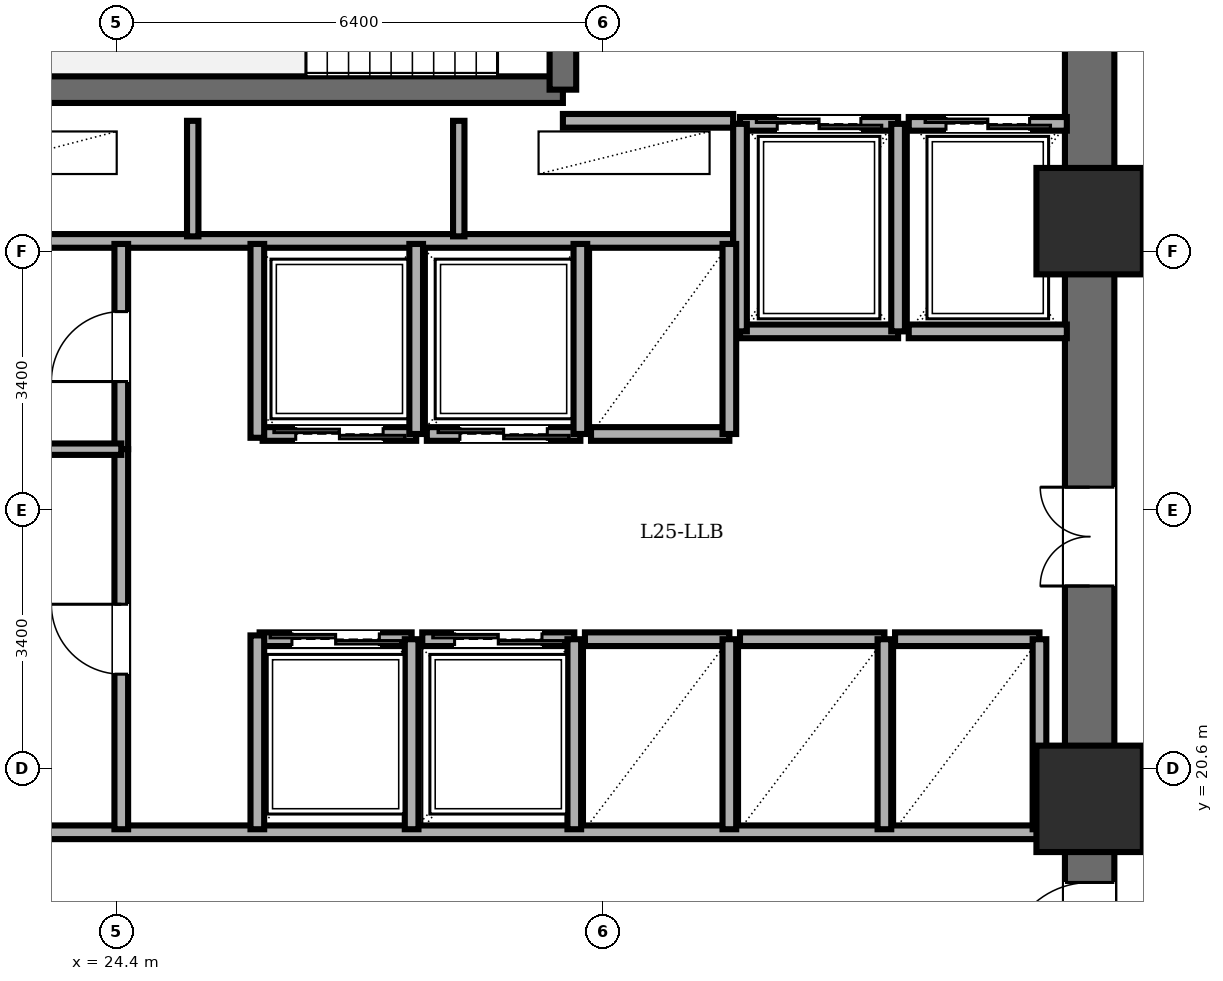
"""IFC4 building model, lengths in metres.
Left out: names, types, materials, properties, quantities, classifications, styles, units other than length and angle.
Written with IfcOpenShell. Run it as: python <this file> out.ifc"""

import sys

from ifc_helpers import new_model, si_unit, direction, frame, frame_2d, origin, origin_2d, place, context, subcontext, project, spatial, rectangle, extrude, element, fill, save


model = new_model("IFC4")
c1 = context("Model", 3, precision=1e-05, world=origin(), true_north=direction((0.0, 1.0)))
c2 = subcontext(c1, "Body", "Model", "MODEL_VIEW")
j1 = project(units=[si_unit("LENGTHUNIT", "METRE"), si_unit("PLANEANGLEUNIT", "RADIAN")], contexts=[c1])
p1 = place(None, origin())
s1 = spatial("IfcSite", under=j1, at=p1, CompositionType="ELEMENT")
p2 = place(p1, origin())
s2 = spatial("IfcBuilding", under=s1, at=p2, CompositionType="ELEMENT")
p3 = place(p2, frame((0.0, 0.0, 97.1)))
s3 = spatial("IfcBuildingStorey", under=s2, at=p3, CompositionType="ELEMENT", Elevation=97.1)
for number, where, z_axis, x_axis in (
    (1, (37.2, 20.2, 0.0), (0.0, 0.0, 1.0), (1.0, 0.0, 0.0)),
    (2, (37.2, 27.8, 0.0), (0.0, 0.0, 1.0), (1.0, 0.0, 0.0)),
):
    element("IfcColumn", number, at=place(p3, frame(where, z_axis=z_axis, x_axis=x_axis)), inside=s3, PredefinedType="COLUMN", context=c2, shape_type="SweptSolid", body=[
        extrude(rectangle(XDim=1.4, YDim=1.4, at=origin_2d()), origin(), (0.0, 0.0, 1.0), 3.6),
    ])
p4 = place(p3, frame((37.2, 14.4, 0.0), z_axis=(0.0, 0.0, 1.0), x_axis=(0.0, 1.0, 0.0)))
e3 = element("IfcWall", 3, at=p4, inside=s3, PredefinedType="SHEAR", context=c2, shape_type="SweptSolid", body=[
    extrude(rectangle(XDim=19.2, YDim=0.65, at=frame_2d((9.6, 0.0))), origin(), (0.0, 0.0, 1.0), 3.4),
])
p5 = place(p4, frame((15.8, 0.0, 0.0)))
e4 = element("IfcOpeningElement", 4, at=p5, cuts=e3, PredefinedType="OPENING", context=c2, shape_type="SweptSolid", body=[
    extrude(rectangle(XDim=1.15, YDim=2.15, at=frame_2d((0.575, 1.075))), frame((0.0, 0.335, 0.0), z_axis=(0.0, -1.0, 0.0), x_axis=(1.0, 0.0, 0.0)), (0.0, 0.0, 1.0), 0.67),
])
p6 = place(p4, frame((3.6, 0.0, 0.0)))
e5 = element("IfcOpeningElement", 5, at=p6, cuts=e3, PredefinedType="OPENING", context=c2, shape_type="SweptSolid", body=[
    extrude(rectangle(XDim=1.1, YDim=2.15, at=frame_2d((0.55, 1.075))), frame((0.0, 0.335, 0.0), z_axis=(0.0, -1.0, 0.0), x_axis=(1.0, 0.0, 0.0)), (0.0, 0.0, 1.0), 0.67),
])
p7 = place(p4, frame((8.6, 0.0, 0.0)))
e6 = element("IfcOpeningElement", 6, at=p7, cuts=e3, PredefinedType="OPENING", context=c2, shape_type="SweptSolid", body=[
    extrude(rectangle(XDim=1.3, YDim=2.2, at=frame_2d((0.65, 1.1))), frame((0.0, 0.335, 0.0), z_axis=(0.0, -1.0, 0.0), x_axis=(1.0, 0.0, 0.0)), (0.0, 0.0, 1.0), 0.67),
])
p8 = place(p3, frame((22.48, 29.53, 0.0), z_axis=(0.0, 0.0, 1.0), x_axis=(1.0, 0.0, 0.0)))
e7 = element("IfcWall", 7, at=p8, inside=s3, PredefinedType="SOLIDWALL", context=c2, shape_type="SweptSolid", body=[
    extrude(rectangle(XDim=7.79, YDim=0.35, at=frame_2d((3.895, 0.0))), origin(), (0.0, 0.0, 1.0), 3.4),
])
p9 = place(p3, frame((30.27, 29.53, 0.0), z_axis=(0.0, 0.0, 1.0), x_axis=(0.0, 1.0, 0.0)))
e8 = element("IfcWall", 8, at=p9, inside=s3, PredefinedType="SOLIDWALL", context=c2, shape_type="SweptSolid", body=[
    extrude(rectangle(XDim=3.58, YDim=0.35, at=frame_2d((1.79, 0.0))), origin(), (0.0, 0.0, 1.0), 3.4),
])
p10 = place(p9, frame((1.25, 0.0, 0.0)))
e9 = element("IfcOpeningElement", 9, at=p10, cuts=e8, PredefinedType="OPENING", context=c2, shape_type="SweptSolid", body=[
    extrude(rectangle(XDim=1.1, YDim=2.15, at=frame_2d((0.55, 1.075))), frame((0.0, 0.185, 0.0), z_axis=(0.0, -1.0, 0.0), x_axis=(1.0, 0.0, 0.0)), (0.0, 0.0, 1.0), 0.37),
])
p11 = place(p3, frame((30.27, 29.12, 0.0), z_axis=(0.0, 0.0, 1.0), x_axis=(1.0, 0.0, 0.0)))
e10 = element("IfcWall", 10, at=p11, inside=s3, PredefinedType="PARTITIONING", context=c2, shape_type="SweptSolid", body=[
    extrude(rectangle(XDim=2.24, YDim=0.18, at=frame_2d((1.12, 0.0))), origin(), (0.0, 0.0, 1.0), 3.4),
])
p12 = place(p3, frame((21.95, 27.54, 0.0), z_axis=(0.0, 0.0, 1.0), x_axis=(1.0, 0.0, 0.0)))
e11 = element("IfcWall", 11, at=p12, inside=s3, PredefinedType="PARTITIONING", context=c2, shape_type="SweptSolid", body=[
    extrude(rectangle(XDim=10.56, YDim=0.18, at=frame_2d((5.28, 0.0))), origin(), (0.0, 0.0, 1.0), 3.4),
])
for number, where, z_axis, x_axis in (
    (12, (25.4, 27.6, 0.0), (0.0, 0.0, 1.0), (0.0, 1.0, 0.0)),
    (13, (28.9, 27.6, 0.0), (0.0, 0.0, 1.0), (0.0, 1.0, 0.0)),
):
    element("IfcWall", number, at=place(p3, frame(where, z_axis=z_axis, x_axis=x_axis)), inside=s3, PredefinedType="PARTITIONING", context=c2, shape_type="SweptSolid", body=[
        extrude(rectangle(XDim=1.52, YDim=0.15, at=frame_2d((0.76, 0.0))), origin(), (0.0, 0.0, 1.0), 3.4),
    ])
p13 = place(p3, frame((21.95, 19.76, 0.0), z_axis=(0.0, 0.0, 1.0), x_axis=(1.0, 0.0, 0.0)))
e14 = element("IfcWall", 14, at=p13, inside=s3, PredefinedType="PARTITIONING", context=c2, shape_type="SweptSolid", body=[
    extrude(rectangle(XDim=14.87, YDim=0.18, at=frame_2d((7.435, 0.0))), origin(), (0.0, 0.0, 1.0), 3.4),
])
p14 = place(p3, frame((32.6, 29.08, 0.0), z_axis=(0.0, 0.0, 1.0), x_axis=(1.0, 0.0, 0.0)))
e15 = element("IfcWall", 15, at=p14, inside=s3, PredefinedType="PARTITIONING", context=c2, shape_type="SweptSolid", body=[
    extrude(rectangle(XDim=2.08, YDim=0.18, at=frame_2d((1.04, 0.0))), origin(), (0.0, 0.0, 1.0), 3.4),
])
p15 = place(p14, frame((0.49, 0.0, 0.0)))
e16 = element("IfcOpeningElement", 16, at=p15, cuts=e15, PredefinedType="OPENING", context=c2, shape_type="SweptSolid", body=[
    extrude(rectangle(XDim=1.1, YDim=2.2, at=frame_2d((0.55, 1.1))), frame((0.0, 0.1, 0.0), z_axis=(0.0, -1.0, 0.0), x_axis=(1.0, 0.0, 0.0)), (0.0, 0.0, 1.0), 0.2),
])
p16 = place(p3, frame((34.68, 26.35, 0.0), z_axis=(0.0, 0.0, 1.0), x_axis=(-1.0, 0.0, 0.0)))
e17 = element("IfcWall", 17, at=p16, inside=s3, PredefinedType="PARTITIONING", context=c2, shape_type="SweptSolid", body=[
    extrude(rectangle(XDim=2.08, YDim=0.18, at=frame_2d((1.04, 0.0))), origin(), (0.0, 0.0, 1.0), 3.4),
])
for number, where, z_axis, x_axis in (
    (18, (34.68, 26.35, 0.0), (0.0, 0.0, 1.0), (0.0, 1.0, 0.0)),
    (19, (32.6, 29.08, 0.0), (0.0, 0.0, 1.0), (0.0, -1.0, 0.0)),
):
    element("IfcWall", number, at=place(p3, frame(where, z_axis=z_axis, x_axis=x_axis)), inside=s3, PredefinedType="PARTITIONING", context=c2, shape_type="SweptSolid", body=[
        extrude(rectangle(XDim=2.73, YDim=0.18, at=frame_2d((1.365, 0.0))), origin(), (0.0, 0.0, 1.0), 3.4),
    ])
p17 = place(p3, frame((34.82, 29.08, 0.0), z_axis=(0.0, 0.0, 1.0), x_axis=(1.0, 0.0, 0.0)))
e20 = element("IfcWall", 20, at=p17, inside=s3, PredefinedType="PARTITIONING", context=c2, shape_type="SweptSolid", body=[
    extrude(rectangle(XDim=2.08, YDim=0.18, at=frame_2d((1.04, 0.0))), origin(), (0.0, 0.0, 1.0), 3.4),
])
p18 = place(p17, frame((0.49, 0.0, 0.0)))
e21 = element("IfcOpeningElement", 21, at=p18, cuts=e20, PredefinedType="OPENING", context=c2, shape_type="SweptSolid", body=[
    extrude(rectangle(XDim=1.1, YDim=2.2, at=frame_2d((0.55, 1.1))), frame((0.0, 0.1, 0.0), z_axis=(0.0, -1.0, 0.0), x_axis=(1.0, 0.0, 0.0)), (0.0, 0.0, 1.0), 0.2),
])
p19 = place(p3, frame((36.9, 26.35, 0.0), z_axis=(0.0, 0.0, 1.0), x_axis=(-1.0, 0.0, 0.0)))
e22 = element("IfcWall", 22, at=p19, inside=s3, PredefinedType="PARTITIONING", context=c2, shape_type="SweptSolid", body=[
    extrude(rectangle(XDim=2.08, YDim=0.18, at=frame_2d((1.04, 0.0))), origin(), (0.0, 0.0, 1.0), 3.4),
])
p20 = place(p3, frame((28.34, 25.0, 0.0), z_axis=(0.0, 0.0, 1.0), x_axis=(-1.0, 0.0, 0.0)))
e23 = element("IfcWall", 23, at=p20, inside=s3, PredefinedType="PARTITIONING", context=c2, shape_type="SweptSolid", body=[
    extrude(rectangle(XDim=2.02, YDim=0.18, at=frame_2d((1.01, 0.0))), origin(), (0.0, 0.0, 1.0), 3.4),
])
p21 = place(p20, frame((0.435, 0.0, 0.0)))
e24 = element("IfcOpeningElement", 24, at=p21, cuts=e23, PredefinedType="OPENING", context=c2, shape_type="SweptSolid", body=[
    extrude(rectangle(XDim=1.15, YDim=2.2, at=frame_2d((0.575, 1.1))), frame((0.0, 0.1, 0.0), z_axis=(0.0, -1.0, 0.0), x_axis=(1.0, 0.0, 0.0)), (0.0, 0.0, 1.0), 0.2),
])
p22 = place(p3, frame((28.34, 25.0, 0.0), z_axis=(0.0, 0.0, 1.0), x_axis=(0.0, 1.0, 0.0)))
e25 = element("IfcWall", 25, at=p22, inside=s3, PredefinedType="PARTITIONING", context=c2, shape_type="SweptSolid", body=[
    extrude(rectangle(XDim=2.5, YDim=0.18, at=frame_2d((1.25, 0.0))), origin(), (0.0, 0.0, 1.0), 3.4),
])
p23 = place(p3, frame((30.5, 25.0, 0.0), z_axis=(0.0, 0.0, 1.0), x_axis=(-1.0, 0.0, 0.0)))
e26 = element("IfcWall", 26, at=p23, inside=s3, PredefinedType="PARTITIONING", context=c2, shape_type="SweptSolid", body=[
    extrude(rectangle(XDim=2.02, YDim=0.18, at=frame_2d((1.01, 0.0))), origin(), (0.0, 0.0, 1.0), 3.4),
])
p24 = place(p23, frame((0.435, 0.0, 0.0)))
e27 = element("IfcOpeningElement", 27, at=p24, cuts=e26, PredefinedType="OPENING", context=c2, shape_type="SweptSolid", body=[
    extrude(rectangle(XDim=1.15, YDim=2.2, at=frame_2d((0.575, 1.1))), frame((0.0, 0.1, 0.0), z_axis=(0.0, -1.0, 0.0), x_axis=(1.0, 0.0, 0.0)), (0.0, 0.0, 1.0), 0.2),
])
p25 = place(p3, frame((30.5, 25.0, 0.0), z_axis=(0.0, 0.0, 1.0), x_axis=(0.0, 1.0, 0.0)))
e28 = element("IfcWall", 28, at=p25, inside=s3, PredefinedType="PARTITIONING", context=c2, shape_type="SweptSolid", body=[
    extrude(rectangle(XDim=2.5, YDim=0.18, at=frame_2d((1.25, 0.0))), origin(), (0.0, 0.0, 1.0), 3.4),
])
p26 = place(p3, frame((26.28, 22.3, 0.0), z_axis=(0.0, 0.0, 1.0), x_axis=(1.0, 0.0, 0.0)))
e29 = element("IfcWall", 29, at=p26, inside=s3, PredefinedType="PARTITIONING", context=c2, shape_type="SweptSolid", body=[
    extrude(rectangle(XDim=2.0, YDim=0.18, at=frame_2d((1.0, 0.0))), origin(), (0.0, 0.0, 1.0), 3.4),
])
p27 = place(p26, frame((0.425, 0.0, 0.0)))
e30 = element("IfcOpeningElement", 30, at=p27, cuts=e29, PredefinedType="OPENING", context=c2, shape_type="SweptSolid", body=[
    extrude(rectangle(XDim=1.15, YDim=2.2, at=frame_2d((0.575, 1.1))), frame((0.0, 0.1, 0.0), z_axis=(0.0, -1.0, 0.0), x_axis=(1.0, 0.0, 0.0)), (0.0, 0.0, 1.0), 0.2),
])
p28 = place(p3, frame((28.28, 19.8, 0.0), z_axis=(0.0, 0.0, 1.0), x_axis=(0.0, 1.0, 0.0)))
e31 = element("IfcWall", 31, at=p28, inside=s3, PredefinedType="PARTITIONING", context=c2, shape_type="SweptSolid", body=[
    extrude(rectangle(XDim=2.5, YDim=0.18, at=frame_2d((1.25, 0.0))), origin(), (0.0, 0.0, 1.0), 3.4),
])
p29 = place(p3, frame((28.42, 22.3, 0.0), z_axis=(0.0, 0.0, 1.0), x_axis=(1.0, 0.0, 0.0)))
e32 = element("IfcWall", 32, at=p29, inside=s3, PredefinedType="PARTITIONING", context=c2, shape_type="SweptSolid", body=[
    extrude(rectangle(XDim=2.0, YDim=0.18, at=frame_2d((1.0, 0.0))), origin(), (0.0, 0.0, 1.0), 3.4),
])
p30 = place(p29, frame((0.425, 0.0, 0.0)))
e33 = element("IfcOpeningElement", 33, at=p30, cuts=e32, PredefinedType="OPENING", context=c2, shape_type="SweptSolid", body=[
    extrude(rectangle(XDim=1.15, YDim=2.2, at=frame_2d((0.575, 1.1))), frame((0.0, 0.1, 0.0), z_axis=(0.0, -1.0, 0.0), x_axis=(1.0, 0.0, 0.0)), (0.0, 0.0, 1.0), 0.2),
])
p31 = place(p3, frame((30.42, 19.8, 0.0), z_axis=(0.0, 0.0, 1.0), x_axis=(0.0, 1.0, 0.0)))
e34 = element("IfcWall", 34, at=p31, inside=s3, PredefinedType="PARTITIONING", context=c2, shape_type="SweptSolid", body=[
    extrude(rectangle(XDim=2.5, YDim=0.18, at=frame_2d((1.25, 0.0))), origin(), (0.0, 0.0, 1.0), 3.4),
])
p32 = place(p3, frame((32.46, 25.0, 0.0), z_axis=(0.0, 0.0, 1.0), x_axis=(-1.0, 0.0, 0.0)))
e35 = element("IfcWall", 35, at=p32, inside=s3, PredefinedType="PARTITIONING", context=c2, shape_type="SweptSolid", body=[
    extrude(rectangle(XDim=1.82, YDim=0.18, at=frame_2d((0.91, 0.0))), origin(), (0.0, 0.0, 1.0), 3.4),
])
p33 = place(p3, frame((32.46, 25.0, 0.0), z_axis=(0.0, 0.0, 1.0), x_axis=(0.0, 1.0, 0.0)))
e36 = element("IfcWall", 36, at=p33, inside=s3, PredefinedType="PARTITIONING", context=c2, shape_type="SweptSolid", body=[
    extrude(rectangle(XDim=2.5, YDim=0.18, at=frame_2d((1.25, 0.0))), origin(), (0.0, 0.0, 1.0), 3.4),
])
p34 = place(p3, frame((30.56, 22.3, 0.0), z_axis=(0.0, 0.0, 1.0), x_axis=(1.0, 0.0, 0.0)))
e37 = element("IfcWall", 37, at=p34, inside=s3, PredefinedType="PARTITIONING", context=c2, shape_type="SweptSolid", body=[
    extrude(rectangle(XDim=1.9, YDim=0.18, at=frame_2d((0.95, 0.0))), origin(), (0.0, 0.0, 1.0), 3.4),
])
p35 = place(p3, frame((32.46, 19.8, 0.0), z_axis=(0.0, 0.0, 1.0), x_axis=(0.0, 1.0, 0.0)))
e38 = element("IfcWall", 38, at=p35, inside=s3, PredefinedType="PARTITIONING", context=c2, shape_type="SweptSolid", body=[
    extrude(rectangle(XDim=2.5, YDim=0.18, at=frame_2d((1.25, 0.0))), origin(), (0.0, 0.0, 1.0), 3.4),
])
p36 = place(p3, frame((32.6, 22.3, 0.0), z_axis=(0.0, 0.0, 1.0), x_axis=(1.0, 0.0, 0.0)))
e39 = element("IfcWall", 39, at=p36, inside=s3, PredefinedType="PARTITIONING", context=c2, shape_type="SweptSolid", body=[
    extrude(rectangle(XDim=1.9, YDim=0.18, at=frame_2d((0.95, 0.0))), origin(), (0.0, 0.0, 1.0), 3.4),
])
p37 = place(p3, frame((34.5, 19.8, 0.0), z_axis=(0.0, 0.0, 1.0), x_axis=(0.0, 1.0, 0.0)))
e40 = element("IfcWall", 40, at=p37, inside=s3, PredefinedType="PARTITIONING", context=c2, shape_type="SweptSolid", body=[
    extrude(rectangle(XDim=2.5, YDim=0.18, at=frame_2d((1.25, 0.0))), origin(), (0.0, 0.0, 1.0), 3.4),
])
p38 = place(p3, frame((34.64, 22.3, 0.0), z_axis=(0.0, 0.0, 1.0), x_axis=(1.0, 0.0, 0.0)))
e41 = element("IfcWall", 41, at=p38, inside=s3, PredefinedType="PARTITIONING", context=c2, shape_type="SweptSolid", body=[
    extrude(rectangle(XDim=1.9, YDim=0.18, at=frame_2d((0.95, 0.0))), origin(), (0.0, 0.0, 1.0), 3.4),
])
p39 = place(p3, frame((36.54, 19.8, 0.0), z_axis=(0.0, 0.0, 1.0), x_axis=(0.0, 1.0, 0.0)))
e42 = element("IfcWall", 42, at=p39, inside=s3, PredefinedType="PARTITIONING", context=c2, shape_type="SweptSolid", body=[
    extrude(rectangle(XDim=2.5, YDim=0.18, at=frame_2d((1.25, 0.0))), origin(), (0.0, 0.0, 1.0), 3.4),
])
p40 = place(p3, frame((24.46, 24.8, 0.0), z_axis=(0.0, 0.0, 1.0), x_axis=(0.0, 1.0, 0.0)))
e43 = element("IfcWall", 43, at=p40, inside=s3, PredefinedType="PARTITIONING", context=c2, shape_type="SweptSolid", body=[
    extrude(rectangle(XDim=2.7, YDim=0.18, at=frame_2d((1.35, 0.0))), origin(), (0.0, 0.0, 1.0), 3.4),
])
p41 = place(p40, frame((0.89, 0.0, 0.0)))
e44 = element("IfcOpeningElement", 44, at=p41, cuts=e43, PredefinedType="OPENING", context=c2, shape_type="SweptSolid", body=[
    extrude(rectangle(XDim=0.92, YDim=2.1, at=frame_2d((0.46, 1.05))), frame((0.0, 0.1, 0.0), z_axis=(0.0, -1.0, 0.0), x_axis=(1.0, 0.0, 0.0)), (0.0, 0.0, 1.0), 0.2),
])
p42 = place(p3, frame((24.46, 19.8, 0.0), z_axis=(0.0, 0.0, 1.0), x_axis=(0.0, 1.0, 0.0)))
e45 = element("IfcWall", 45, at=p42, inside=s3, PredefinedType="PARTITIONING", context=c2, shape_type="SweptSolid", body=[
    extrude(rectangle(XDim=5.0, YDim=0.18, at=frame_2d((2.5, 0.0))), origin(), (0.0, 0.0, 1.0), 3.4),
])
p43 = place(p42, frame((2.04, 0.0, 0.0)))
e46 = element("IfcOpeningElement", 46, at=p43, cuts=e45, PredefinedType="OPENING", context=c2, shape_type="SweptSolid", body=[
    extrude(rectangle(XDim=0.92, YDim=2.1, at=frame_2d((0.46, 1.05))), frame((0.0, 0.1, 0.0), z_axis=(0.0, -1.0, 0.0), x_axis=(1.0, 0.0, 0.0)), (0.0, 0.0, 1.0), 0.2),
])
p44 = place(p3, frame((21.95, 24.8, 0.0), z_axis=(0.0, 0.0, 1.0), x_axis=(1.0, 0.0, 0.0)))
e47 = element("IfcWall", 47, at=p44, inside=s3, PredefinedType="PARTITIONING", context=c2, shape_type="SweptSolid", body=[
    extrude(rectangle(XDim=2.51, YDim=0.15, at=frame_2d((1.255, 0.0))), origin(), (0.0, 0.0, 1.0), 3.4),
])
for number, where, z_axis, x_axis in (
    (48, (26.25, 24.95, 0.0), (0.0, 0.0, 1.0), (0.0, 1.0, 0.0)),
    (49, (26.25, 19.8, 0.0), (0.0, 0.0, 1.0), (0.0, 1.0, 0.0)),
):
    element("IfcWall", number, at=place(p3, frame(where, z_axis=z_axis, x_axis=x_axis)), inside=s3, PredefinedType="PARTITIONING", context=c2, shape_type="SweptSolid", body=[
        extrude(rectangle(XDim=2.55, YDim=0.18, at=frame_2d((1.275, 0.0))), origin(), (0.0, 0.0, 1.0), 3.4),
    ])
p45 = place(p6, origin())
e50 = element("IfcDoor", 50, at=p45, inside=s3, OperationType="SINGLE_SWING_LEFT", PredefinedType="DOOR", context=c2, shape_type="SweptSolid", body=[
    extrude(rectangle(XDim=1.1, YDim=2.15, at=frame_2d((0.55, 1.075))), frame((0.0, 0.025, 0.0), z_axis=(0.0, -1.0, 0.0), x_axis=(1.0, 0.0, 0.0)), (0.0, 0.0, 1.0), 0.05),
])
fill(e5, e50)
p46 = place(p15, origin())
e51 = element("IfcDoor", 51, at=p46, inside=s3, OperationType="DOUBLE_DOOR_SLIDING", PredefinedType="DOOR", context=c2, shape_type="SweptSolid", body=[
    extrude(rectangle(XDim=1.1, YDim=2.2, at=frame_2d((0.55, 1.1))), frame((0.0, 0.025, 0.0), z_axis=(0.0, -1.0, 0.0), x_axis=(1.0, 0.0, 0.0)), (0.0, 0.0, 1.0), 0.05),
])
fill(e16, e51)
p47 = place(p18, origin())
e52 = element("IfcDoor", 52, at=p47, inside=s3, OperationType="DOUBLE_DOOR_SLIDING", PredefinedType="DOOR", context=c2, shape_type="SweptSolid", body=[
    extrude(rectangle(XDim=1.1, YDim=2.2, at=frame_2d((0.55, 1.1))), frame((0.0, 0.025, 0.0), z_axis=(0.0, -1.0, 0.0), x_axis=(1.0, 0.0, 0.0)), (0.0, 0.0, 1.0), 0.05),
])
fill(e21, e52)
p48 = place(p21, origin())
e53 = element("IfcDoor", 53, at=p48, inside=s3, OperationType="DOUBLE_DOOR_SLIDING", PredefinedType="DOOR", context=c2, shape_type="SweptSolid", body=[
    extrude(rectangle(XDim=1.15, YDim=2.2, at=frame_2d((0.575, 1.1))), frame((0.0, 0.025, 0.0), z_axis=(0.0, -1.0, 0.0), x_axis=(1.0, 0.0, 0.0)), (0.0, 0.0, 1.0), 0.05),
])
fill(e24, e53)
p49 = place(p24, origin())
e54 = element("IfcDoor", 54, at=p49, inside=s3, OperationType="DOUBLE_DOOR_SLIDING", PredefinedType="DOOR", context=c2, shape_type="SweptSolid", body=[
    extrude(rectangle(XDim=1.15, YDim=2.2, at=frame_2d((0.575, 1.1))), frame((0.0, 0.025, 0.0), z_axis=(0.0, -1.0, 0.0), x_axis=(1.0, 0.0, 0.0)), (0.0, 0.0, 1.0), 0.05),
])
fill(e27, e54)
p50 = place(p27, origin())
e55 = element("IfcDoor", 55, at=p50, inside=s3, OperationType="DOUBLE_DOOR_SLIDING", PredefinedType="DOOR", context=c2, shape_type="SweptSolid", body=[
    extrude(rectangle(XDim=1.15, YDim=2.2, at=frame_2d((0.575, 1.1))), frame((0.0, 0.025, 0.0), z_axis=(0.0, -1.0, 0.0), x_axis=(1.0, 0.0, 0.0)), (0.0, 0.0, 1.0), 0.05),
])
fill(e30, e55)
p51 = place(p30, origin())
e56 = element("IfcDoor", 56, at=p51, inside=s3, OperationType="DOUBLE_DOOR_SLIDING", PredefinedType="DOOR", context=c2, shape_type="SweptSolid", body=[
    extrude(rectangle(XDim=1.15, YDim=2.2, at=frame_2d((0.575, 1.1))), frame((0.0, 0.025, 0.0), z_axis=(0.0, -1.0, 0.0), x_axis=(1.0, 0.0, 0.0)), (0.0, 0.0, 1.0), 0.05),
])
fill(e33, e56)
p52 = place(p41, origin())
e57 = element("IfcDoor", 57, at=p52, inside=s3, OperationType="SINGLE_SWING_LEFT", PredefinedType="DOOR", context=c2, shape_type="SweptSolid", body=[
    extrude(rectangle(XDim=0.92, YDim=2.1, at=frame_2d((0.46, 1.05))), frame((0.0, 0.025, 0.0), z_axis=(0.0, -1.0, 0.0), x_axis=(1.0, 0.0, 0.0)), (0.0, 0.0, 1.0), 0.05),
])
fill(e44, e57)
p53 = place(p43, origin())
e58 = element("IfcDoor", 58, at=p53, inside=s3, OperationType="SINGLE_SWING_RIGHT", PredefinedType="DOOR", context=c2, shape_type="SweptSolid", body=[
    extrude(rectangle(XDim=0.92, YDim=2.1, at=frame_2d((0.46, 1.05))), frame((0.0, 0.025, 0.0), z_axis=(0.0, -1.0, 0.0), x_axis=(1.0, 0.0, 0.0)), (0.0, 0.0, 1.0), 0.05),
])
fill(e46, e58)
p54 = place(p7, origin())
e59 = element("IfcDoor", 59, at=p54, inside=s3, OperationType="DOUBLE_DOOR_SINGLE_SWING", PredefinedType="DOOR", context=c2, shape_type="SweptSolid", body=[
    extrude(rectangle(XDim=1.3, YDim=2.2, at=frame_2d((0.65, 1.1))), frame((0.0, 0.025, 0.0), z_axis=(0.0, -1.0, 0.0), x_axis=(1.0, 0.0, 0.0)), (0.0, 0.0, 1.0), 0.05),
])
fill(e6, e59)
save(model, sys.argv[1])
